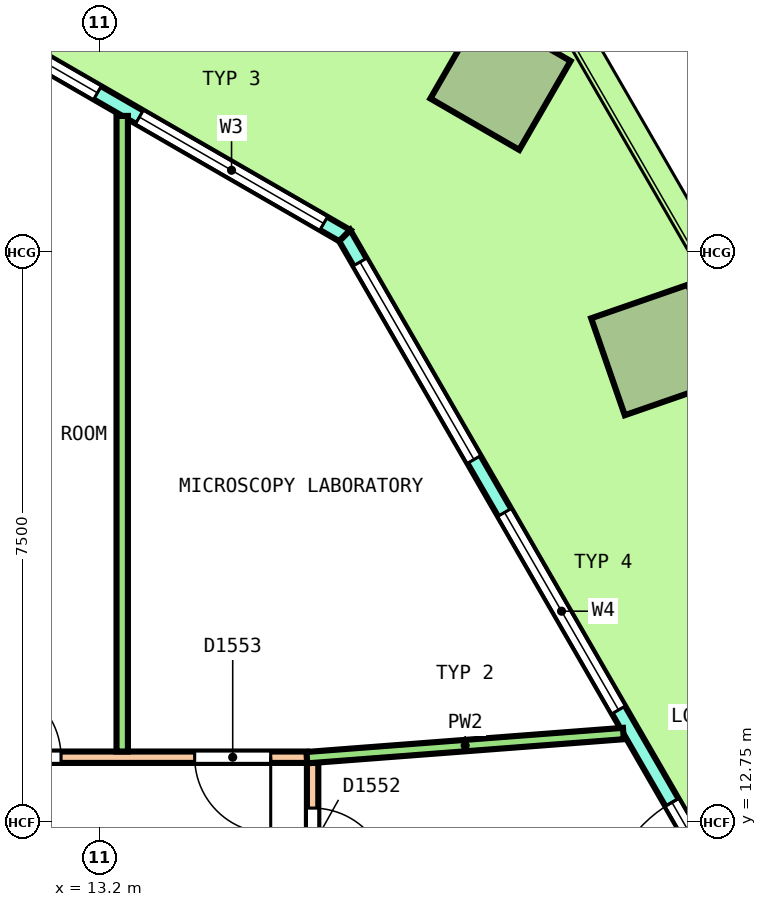
"""IFC4 building model, lengths in metres.
Left out: names, types, materials, properties, quantities, classifications, styles, units other than length and angle.
Written with IfcOpenShell. Run it as: python <this file> out.ifc"""

import sys

from ifc_helpers import new_model, si_unit, direction, frame, frame_2d, origin, origin_2d, place, context, subcontext, project, spatial, polyline, rectangle, outline, extrude, element, fill, save


model = new_model("IFC4")
c1 = context("Model", 3, precision=1e-05, world=origin(), true_north=direction((0.0, 1.0)))
c2 = subcontext(c1, "Body", "Model", "MODEL_VIEW")
j1 = project(units=[si_unit("LENGTHUNIT", "METRE"), si_unit("PLANEANGLEUNIT", "RADIAN")], contexts=[c1])
p1 = place(None, origin())
s1 = spatial("IfcSite", under=j1, at=p1, CompositionType="ELEMENT")
p2 = place(p1, origin())
s2 = spatial("IfcBuilding", under=s1, at=p2, CompositionType="ELEMENT")
p3 = place(p2, frame((0.0, 0.0, 98.4)))
s3 = spatial("IfcBuildingStorey", under=s2, at=p3, CompositionType="ELEMENT", Elevation=98.4)
p4 = place(p3, frame((20.524, 18.958, 0.0), z_axis=(0.032654187208, 0.006265748099, 0.999447069363), x_axis=(-0.499519823947, 0.866234008258, 0.010889831076)))
e1 = element("IfcColumn", 1, at=p4, inside=s3, PredefinedType="COLUMN", context=c2, shape_type="SweptSolid", body=[
    extrude(rectangle(XDim=1.35, YDim=1.35, at=origin_2d()), origin(), (0.0, 0.0, 1.0), 4.052),
])
p5 = place(p3, frame((18.472, 22.512, 0.0), z_axis=(0.036265236264, 0.0, 0.999342199969), x_axis=(-0.865313546461, 0.500246354177, 0.031401456084)))
e2 = element("IfcColumn", 2, at=p5, inside=s3, PredefinedType="COLUMN", context=c2, shape_type="SweptSolid", body=[
    extrude(rectangle(XDim=1.35, YDim=1.35, at=origin_2d()), origin(), (0.0, 0.0, 1.0), 4.053),
])
p6 = place(p3, frame((25.932, 3.99, 0.0), z_axis=(0.0, 0.0, 1.0), x_axis=(-0.500001707189, 0.866024418136, 0.0)))
e3 = element("IfcWall", 3, at=p6, inside=s3, PredefinedType="SOLIDWALL", context=c2, shape_type="SweptSolid", body=[
    extrude(outline(polyline([(-0.027, -0.1), (0.977, -0.1), (1.981, -0.1), (2.985, -0.1), (3.989, -0.1), (4.993, -0.1), (5.997, -0.1), (7.0, -0.1), (8.004, -0.1), (9.008, -0.1), (10.012, -0.1), (11.016, -0.1), (12.02, -0.1), (13.024, -0.1), (14.028, -0.1), (15.032, -0.1), (16.036, -0.1), (17.04, -0.1), (18.043, -0.1), (19.047, -0.1), (18.994, 0.1), (17.995, 0.1), (16.997, 0.1), (15.999, 0.1), (15.001, 0.1), (14.002, 0.1), (13.004, 0.1), (12.006, 0.1), (11.008, 0.1), (10.009, 0.1), (9.011, 0.1), (8.013, 0.1), (7.015, 0.1), (6.016, 0.1), (5.018, 0.1), (4.02, 0.1), (3.022, 0.1), (2.023, 0.1), (1.025, 0.1), (0.027, 0.1), (-0.027, -0.1)])), origin(), (0.0, 0.0, 1.0), 4.1),
])
p7 = place(p6, frame((0.402, 0.0, 0.1)))
e4 = element("IfcOpeningElement", 4, at=p7, cuts=e3, PredefinedType="OPENING", context=c2, shape_type="SweptSolid", body=[
    extrude(rectangle(XDim=3.0, YDim=2.9, at=frame_2d((1.5, 1.45))), frame((0.0, 0.11, 0.0), z_axis=(0.0, -1.0, 0.0), x_axis=(1.0, 0.0, 0.0)), (0.0, 0.0, 1.0), 0.22),
])
p8 = place(p6, frame((4.206, 0.0, 0.1)))
e5 = element("IfcOpeningElement", 5, at=p8, cuts=e3, PredefinedType="OPENING", context=c2, shape_type="SweptSolid", body=[
    extrude(rectangle(XDim=3.0, YDim=2.9, at=frame_2d((1.5, 1.45))), frame((0.0, 0.11, 0.0), z_axis=(0.0, -1.0, 0.0), x_axis=(1.0, 0.0, 0.0)), (0.0, 0.0, 1.0), 0.22),
])
p9 = place(p6, frame((8.61, 0.0, 0.0)))
e6 = element("IfcOpeningElement", 6, at=p9, cuts=e3, PredefinedType="OPENING", context=c2, shape_type="SweptSolid", body=[
    extrude(rectangle(XDim=1.8, YDim=2.4, at=frame_2d((0.9, 1.2))), frame((0.0, 0.11, 0.0), z_axis=(0.0, -1.0, 0.0), x_axis=(1.0, 0.0, 0.0)), (0.0, 0.0, 1.0), 0.22),
])
p10 = place(p6, frame((8.61, 0.0, 2.55)))
e7 = element("IfcOpeningElement", 7, at=p10, cuts=e3, PredefinedType="OPENING", context=c2, shape_type="SweptSolid", body=[
    extrude(rectangle(XDim=1.8, YDim=0.45, at=frame_2d((0.9, 0.225))), frame((0.0, 0.11, 0.0), z_axis=(0.0, -1.0, 0.0), x_axis=(1.0, 0.0, 0.0)), (0.0, 0.0, 1.0), 0.22),
])
p11 = place(p6, frame((11.814, 0.0, 0.1)))
e8 = element("IfcOpeningElement", 8, at=p11, cuts=e3, PredefinedType="OPENING", context=c2, shape_type="SweptSolid", body=[
    extrude(rectangle(XDim=3.0, YDim=2.9, at=frame_2d((1.5, 1.45))), frame((0.0, 0.11, 0.0), z_axis=(0.0, -1.0, 0.0), x_axis=(1.0, 0.0, 0.0)), (0.0, 0.0, 1.0), 0.22),
])
p12 = place(p6, frame((15.618, 0.0, 0.1)))
e9 = element("IfcOpeningElement", 9, at=p12, cuts=e3, PredefinedType="OPENING", context=c2, shape_type="SweptSolid", body=[
    extrude(rectangle(XDim=3.0, YDim=2.9, at=frame_2d((1.5, 1.45))), frame((0.0, 0.11, 0.0), z_axis=(0.0, -1.0, 0.0), x_axis=(1.0, 0.0, 0.0)), (0.0, 0.0, 1.0), 0.22),
])
p13 = place(p3, frame((16.422, 20.463, 0.0), z_axis=(0.0, 0.0, 1.0), x_axis=(-0.866029458321, 0.49999297727, 0.0)))
e10 = element("IfcWall", 10, at=p13, inside=s3, PredefinedType="SOLIDWALL", context=c2, shape_type="SweptSolid", body=[
    extrude(outline(polyline([(-0.027, -0.1), (1.128, -0.1), (2.282, -0.1), (3.437, -0.1), (4.592, -0.1), (5.747, -0.1), (6.901, -0.1), (6.848, 0.1), (5.711, 0.1), (4.574, 0.1), (3.437, 0.1), (2.301, 0.1), (1.164, 0.1), (0.027, 0.1), (-0.027, -0.1)])), origin(), (0.0, 0.0, 1.0), 4.1),
])
p14 = place(p13, frame((0.319, 0.0, 0.1)))
e11 = element("IfcOpeningElement", 11, at=p14, cuts=e10, PredefinedType="OPENING", context=c2, shape_type="SweptSolid", body=[
    extrude(rectangle(XDim=2.8, YDim=2.9, at=frame_2d((1.4, 1.45))), frame((0.0, 0.11, 0.0), z_axis=(0.0, -1.0, 0.0), x_axis=(1.0, 0.0, 0.0)), (0.0, 0.0, 1.0), 0.22),
])
p15 = place(p13, frame((3.756, 0.0, 0.1)))
e12 = element("IfcOpeningElement", 12, at=p15, cuts=e10, PredefinedType="OPENING", context=c2, shape_type="SweptSolid", body=[
    extrude(rectangle(XDim=2.8, YDim=2.9, at=frame_2d((1.4, 1.45))), frame((0.0, 0.11, 0.0), z_axis=(0.0, -1.0, 0.0), x_axis=(1.0, 0.0, 0.0)), (0.0, 0.0, 1.0), 0.22),
])
p16 = place(p3, frame((16.0, -13.525, 0.0), z_axis=(0.0, 0.0, 1.0), x_axis=(0.0, 1.0, 0.0)))
e13 = element("IfcWall", 13, at=p16, inside=s3, PredefinedType="PARTITIONING", context=c2, shape_type="SweptSolid", body=[
    extrude(rectangle(XDim=27.05, YDim=0.15, at=frame_2d((13.525, 0.0))), origin(), (0.0, 0.0, 1.0), 3.05),
])
p17 = place(p16, frame((18.514, 0.0, 0.0)))
e14 = element("IfcOpeningElement", 14, at=p17, cuts=e13, PredefinedType="OPENING", context=c2, shape_type="SweptSolid", body=[
    extrude(rectangle(XDim=1.2, YDim=2.1, at=frame_2d((0.6, 1.05))), frame((0.0, 0.085, 0.0), z_axis=(0.0, -1.0, 0.0), x_axis=(1.0, 0.0, 0.0)), (0.0, 0.0, 1.0), 0.17),
])
p18 = place(p16, frame((25.456, 0.0, 0.0)))
e15 = element("IfcOpeningElement", 15, at=p18, cuts=e13, PredefinedType="OPENING", context=c2, shape_type="SweptSolid", body=[
    extrude(rectangle(XDim=1.0, YDim=2.1, at=frame_2d((0.5, 1.05))), frame((0.0, 0.085, 0.0), z_axis=(0.0, -1.0, 0.0), x_axis=(1.0, 0.0, 0.0)), (0.0, 0.0, 1.0), 0.17),
])
p19 = place(p16, frame((1.134, 0.0, 0.0)))
e16 = element("IfcOpeningElement", 16, at=p19, cuts=e13, PredefinedType="OPENING", context=c2, shape_type="SweptSolid", body=[
    extrude(rectangle(XDim=1.0, YDim=2.1, at=frame_2d((0.5, 1.05))), frame((0.0, 0.085, 0.0), z_axis=(0.0, -1.0, 0.0), x_axis=(1.0, 0.0, 0.0)), (0.0, 0.0, 1.0), 0.17),
])
p20 = place(p16, frame((4.37, 0.0, 0.0)))
e17 = element("IfcOpeningElement", 17, at=p20, cuts=e13, PredefinedType="OPENING", context=c2, shape_type="SweptSolid", body=[
    extrude(rectangle(XDim=1.0, YDim=2.1, at=frame_2d((0.5, 1.05))), frame((0.0, 0.085, 0.0), z_axis=(0.0, -1.0, 0.0), x_axis=(1.0, 0.0, 0.0)), (0.0, 0.0, 1.0), 0.17),
])
p21 = place(p16, frame((7.812, 0.0, 0.0)))
e18 = element("IfcOpeningElement", 18, at=p21, cuts=e13, PredefinedType="OPENING", context=c2, shape_type="SweptSolid", body=[
    extrude(rectangle(XDim=1.0, YDim=2.1, at=frame_2d((0.5, 1.05))), frame((0.0, 0.085, 0.0), z_axis=(0.0, -1.0, 0.0), x_axis=(1.0, 0.0, 0.0)), (0.0, 0.0, 1.0), 0.17),
])
p22 = place(p16, frame((11.846, 0.0, 0.0)))
e19 = element("IfcOpeningElement", 19, at=p22, cuts=e13, PredefinedType="OPENING", context=c2, shape_type="SweptSolid", body=[
    extrude(rectangle(XDim=1.0, YDim=2.1, at=frame_2d((0.5, 1.05))), frame((0.0, 0.085, 0.0), z_axis=(0.0, -1.0, 0.0), x_axis=(1.0, 0.0, 0.0)), (0.0, 0.0, 1.0), 0.17),
])
p23 = place(p3, frame((-15.925, 13.6, 0.0), z_axis=(0.0, 0.0, 1.0), x_axis=(1.0, 0.0, 0.0)))
e20 = element("IfcWall", 20, at=p23, inside=s3, PredefinedType="PARTITIONING", context=c2, shape_type="SweptSolid", body=[
    extrude(rectangle(XDim=31.85, YDim=0.15, at=frame_2d((15.925, 0.0))), origin(), (0.0, 0.0, 1.0), 3.05),
])
p24 = place(p23, frame((30.374, 0.0, 0.0)))
e21 = element("IfcOpeningElement", 21, at=p24, cuts=e20, PredefinedType="OPENING", context=c2, shape_type="SweptSolid", body=[
    extrude(rectangle(XDim=1.0, YDim=2.1, at=frame_2d((0.5, 1.05))), frame((0.0, 0.085, 0.0), z_axis=(0.0, -1.0, 0.0), x_axis=(1.0, 0.0, 0.0)), (0.0, 0.0, 1.0), 0.17),
])
p25 = place(p23, frame((27.615, 0.0, 0.0)))
e22 = element("IfcOpeningElement", 22, at=p25, cuts=e20, PredefinedType="OPENING", context=c2, shape_type="SweptSolid", body=[
    extrude(rectangle(XDim=1.0, YDim=2.1, at=frame_2d((0.5, 1.05))), frame((0.0, 0.085, 0.0), z_axis=(0.0, -1.0, 0.0), x_axis=(1.0, 0.0, 0.0)), (0.0, 0.0, 1.0), 0.17),
])
p26 = place(p23, frame((16.85, 0.0, 0.0)))
e23 = element("IfcOpeningElement", 23, at=p26, cuts=e20, PredefinedType="OPENING", context=c2, shape_type="SweptSolid", body=[
    extrude(rectangle(XDim=1.2, YDim=2.1, at=frame_2d((0.6, 1.05))), frame((0.0, 0.085, 0.0), z_axis=(0.0, -1.0, 0.0), x_axis=(1.0, 0.0, 0.0)), (0.0, 0.0, 1.0), 0.17),
])
p27 = place(p23, frame((10.802, 0.0, 0.0)))
e24 = element("IfcOpeningElement", 24, at=p27, cuts=e20, PredefinedType="OPENING", context=c2, shape_type="SweptSolid", body=[
    extrude(rectangle(XDim=1.0, YDim=2.1, at=frame_2d((0.5, 1.05))), frame((0.0, 0.085, 0.0), z_axis=(0.0, -1.0, 0.0), x_axis=(1.0, 0.0, 0.0)), (0.0, 0.0, 1.0), 0.17),
])
p28 = place(p23, frame((3.235, 0.0, 0.0)))
e25 = element("IfcOpeningElement", 25, at=p28, cuts=e20, PredefinedType="OPENING", context=c2, shape_type="SweptSolid", body=[
    extrude(rectangle(XDim=1.0, YDim=2.1, at=frame_2d((0.5, 1.05))), frame((0.0, 0.085, 0.0), z_axis=(0.0, -1.0, 0.0), x_axis=(1.0, 0.0, 0.0)), (0.0, 0.0, 1.0), 0.17),
])
p29 = place(p23, frame((0.879, 0.0, 0.0)))
e26 = element("IfcOpeningElement", 26, at=p29, cuts=e20, PredefinedType="OPENING", context=c2, shape_type="SweptSolid", body=[
    extrude(rectangle(XDim=1.0, YDim=2.1, at=frame_2d((0.5, 1.05))), frame((0.0, 0.085, 0.0), z_axis=(0.0, -1.0, 0.0), x_axis=(1.0, 0.0, 0.0)), (0.0, 0.0, 1.0), 0.17),
])
p30 = place(p3, frame((15.925, 13.594, 0.0), z_axis=(0.0, 0.0, 1.0), x_axis=(0.997106874754, 0.076012369506, 0.0)))
e27 = element("IfcWall", 27, at=p30, inside=s3, PredefinedType="PARTITIONING", context=c2, shape_type="SweptSolid", body=[
    extrude(rectangle(XDim=4.175, YDim=0.15, at=frame_2d((2.088, 0.0))), origin(), (0.0, 0.0, 1.0), 3.05),
])
p31 = place(p3, frame((13.495, 13.675, 0.0), z_axis=(0.0, 0.0, 1.0), x_axis=(0.0, 1.0, 0.0)))
e28 = element("IfcWall", 28, at=p31, inside=s3, PredefinedType="PARTITIONING", context=c2, shape_type="SweptSolid", body=[
    extrude(rectangle(XDim=8.362, YDim=0.15, at=frame_2d((4.181, 0.0))), origin(), (0.0, 0.0, 1.0), 3.05),
])
p32 = place(p9, origin())
e29 = element("IfcDoor", 29, at=p32, inside=s3, OperationType="DOUBLE_DOOR_SINGLE_SWING", PredefinedType="DOOR", context=c2, shape_type="SweptSolid", body=[
    extrude(rectangle(XDim=1.8, YDim=2.4, at=frame_2d((0.9, 1.2))), frame((0.0, 0.025, 0.0), z_axis=(0.0, -1.0, 0.0), x_axis=(1.0, 0.0, 0.0)), (0.0, 0.0, 1.0), 0.05),
])
fill(e6, e29)
p33 = place(p10, origin())
e30 = element("IfcWindow", 30, at=p33, inside=s3, PartitioningType="SINGLE_PANEL", PredefinedType="WINDOW", context=c2, shape_type="SweptSolid", body=[
    extrude(rectangle(XDim=1.8, YDim=0.45, at=frame_2d((0.9, 0.225))), frame((0.0, 0.03, 0.0), z_axis=(0.0, -1.0, 0.0), x_axis=(1.0, 0.0, 0.0)), (0.0, 0.0, 1.0), 0.06),
])
fill(e7, e30)
p34 = place(p11, origin())
e31 = element("IfcWindow", 31, at=p34, inside=s3, PartitioningType="SINGLE_PANEL", PredefinedType="WINDOW", context=c2, shape_type="SweptSolid", body=[
    extrude(rectangle(XDim=3.0, YDim=2.9, at=frame_2d((1.5, 1.45))), frame((0.0, 0.03, 0.0), z_axis=(0.0, -1.0, 0.0), x_axis=(1.0, 0.0, 0.0)), (0.0, 0.0, 1.0), 0.06),
])
fill(e8, e31)
p35 = place(p12, origin())
e32 = element("IfcWindow", 32, at=p35, inside=s3, PartitioningType="SINGLE_PANEL", PredefinedType="WINDOW", context=c2, shape_type="SweptSolid", body=[
    extrude(rectangle(XDim=3.0, YDim=2.9, at=frame_2d((1.5, 1.45))), frame((0.0, 0.03, 0.0), z_axis=(0.0, -1.0, 0.0), x_axis=(1.0, 0.0, 0.0)), (0.0, 0.0, 1.0), 0.06),
])
fill(e9, e32)
p36 = place(p14, origin())
e33 = element("IfcWindow", 33, at=p36, inside=s3, PartitioningType="SINGLE_PANEL", PredefinedType="WINDOW", context=c2, shape_type="SweptSolid", body=[
    extrude(rectangle(XDim=2.8, YDim=2.9, at=frame_2d((1.4, 1.45))), frame((0.0, 0.03, 0.0), z_axis=(0.0, -1.0, 0.0), x_axis=(1.0, 0.0, 0.0)), (0.0, 0.0, 1.0), 0.06),
])
fill(e11, e33)
p37 = place(p15, origin())
e34 = element("IfcWindow", 34, at=p37, inside=s3, PartitioningType="SINGLE_PANEL", PredefinedType="WINDOW", context=c2, shape_type="SweptSolid", body=[
    extrude(rectangle(XDim=2.8, YDim=2.9, at=frame_2d((1.4, 1.45))), frame((0.0, 0.03, 0.0), z_axis=(0.0, -1.0, 0.0), x_axis=(1.0, 0.0, 0.0)), (0.0, 0.0, 1.0), 0.06),
])
fill(e12, e34)
p38 = place(p18, origin())
e35 = element("IfcDoor", 35, at=p38, inside=s3, OperationType="SINGLE_SWING_LEFT", PredefinedType="DOOR", context=c2, shape_type="SweptSolid", body=[
    extrude(rectangle(XDim=1.0, YDim=2.1, at=frame_2d((0.5, 1.05))), frame((0.0, 0.025, 0.0), z_axis=(0.0, -1.0, 0.0), x_axis=(1.0, 0.0, 0.0)), (0.0, 0.0, 1.0), 0.05),
])
fill(e15, e35)
p39 = place(p24, origin())
e36 = element("IfcDoor", 36, at=p39, inside=s3, OperationType="SINGLE_SWING_LEFT", PredefinedType="DOOR", context=c2, shape_type="SweptSolid", body=[
    extrude(rectangle(XDim=1.0, YDim=2.1, at=frame_2d((0.5, 1.05))), frame((0.0, 0.025, 0.0), z_axis=(0.0, -1.0, 0.0), x_axis=(1.0, 0.0, 0.0)), (0.0, 0.0, 1.0), 0.05),
])
fill(e21, e36)
p40 = place(p25, origin())
e37 = element("IfcDoor", 37, at=p40, inside=s3, OperationType="SINGLE_SWING_RIGHT", PredefinedType="DOOR", context=c2, shape_type="SweptSolid", body=[
    extrude(rectangle(XDim=1.0, YDim=2.1, at=frame_2d((0.5, 1.05))), frame((0.0, 0.025, 0.0), z_axis=(0.0, -1.0, 0.0), x_axis=(1.0, 0.0, 0.0)), (0.0, 0.0, 1.0), 0.05),
])
fill(e22, e37)
save(model, sys.argv[1])
